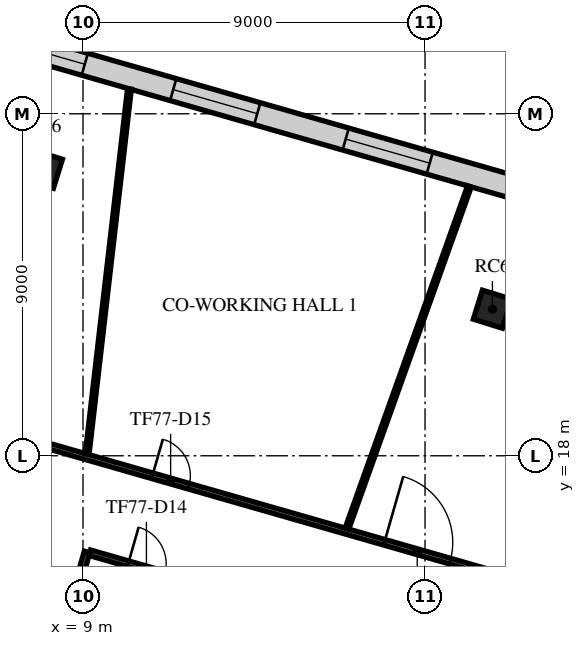
"""IFC4 building model, lengths in metres.
Left out: names, types, materials, properties, quantities, classifications, styles, units other than length and angle.
Written with IfcOpenShell. Run it as: python <this file> out.ifc"""

import sys

from ifc_helpers import new_model, si_unit, direction, frame, frame_2d, origin, origin_2d, place, context, subcontext, project, spatial, rectangle, extrude, element, fill, save


model = new_model("IFC4")
c1 = context("Model", 3, precision=1e-05, world=origin(), true_north=direction((0.0, 1.0)))
c2 = subcontext(c1, "Body", "Model", "MODEL_VIEW")
j1 = project(units=[si_unit("LENGTHUNIT", "METRE"), si_unit("PLANEANGLEUNIT", "RADIAN")], contexts=[c1])
p1 = place(None, origin())
s1 = spatial("IfcSite", under=j1, at=p1, CompositionType="ELEMENT")
p2 = place(p1, origin())
s2 = spatial("IfcBuilding", under=s1, at=p2, CompositionType="ELEMENT")
p3 = place(p2, frame((0.0, 0.0, 324.5)))
s3 = spatial("IfcBuildingStorey", under=s2, at=p3, CompositionType="ELEMENT", Elevation=324.5)
for number, where, z_axis, x_axis in (
    (1, (19.773, 21.857, 0.0), (0.0, 0.0, 1.0), (0.298, 0.955, 0.0)),
    (2, (7.958, 25.539, 0.0), (0.0, 0.0, 1.0), (0.298, 0.955, 0.0)),
):
    element("IfcColumn", number, at=place(p3, frame(where, z_axis=z_axis, x_axis=x_axis)), inside=s3, PredefinedType="COLUMN", context=c2, shape_type="SweptSolid", body=[
        extrude(rectangle(XDim=0.8, YDim=0.8, at=origin_2d()), origin(), (0.0, 0.0, 1.0), 4.0),
    ])
p4 = place(p3, frame((19.053, -30.42, 0.0), z_axis=(0.0, 0.0, 1.0), x_axis=(0.275637022814, 0.961261791425, 0.0)))
e3 = element("IfcWall", 3, at=p4, inside=s3, PredefinedType="STANDARD", context=c2, shape_type="SweptSolid", body=[
    extrude(rectangle(XDim=47.979, YDim=0.6, at=frame_2d((23.99, 0.0))), origin(), (0.0, 0.0, 1.0), 3.65),
])
p5 = place(p4, frame((1.231, 0.0, 0.9)))
e4 = element("IfcOpeningElement", 4, at=p5, cuts=e3, PredefinedType="OPENING", context=c2, shape_type="SweptSolid", body=[
    extrude(rectangle(XDim=1.9, YDim=2.1, at=frame_2d((0.95, 1.05))), frame((0.0, 0.31, 0.0), z_axis=(0.0, -1.0, 0.0), x_axis=(1.0, 0.0, 0.0)), (0.0, 0.0, 1.0), 0.62),
])
p6 = place(p4, frame((5.593, 0.0, 0.9)))
e5 = element("IfcOpeningElement", 5, at=p6, cuts=e3, PredefinedType="OPENING", context=c2, shape_type="SweptSolid", body=[
    extrude(rectangle(XDim=1.9, YDim=2.1, at=frame_2d((0.95, 1.05))), frame((0.0, 0.31, 0.0), z_axis=(0.0, -1.0, 0.0), x_axis=(1.0, 0.0, 0.0)), (0.0, 0.0, 1.0), 0.62),
])
p7 = place(p4, frame((9.954, 0.0, 0.9)))
e6 = element("IfcOpeningElement", 6, at=p7, cuts=e3, PredefinedType="OPENING", context=c2, shape_type="SweptSolid", body=[
    extrude(rectangle(XDim=1.9, YDim=2.1, at=frame_2d((0.95, 1.05))), frame((0.0, 0.31, 0.0), z_axis=(0.0, -1.0, 0.0), x_axis=(1.0, 0.0, 0.0)), (0.0, 0.0, 1.0), 0.62),
])
p8 = place(p4, frame((14.316, 0.0, 0.9)))
e7 = element("IfcOpeningElement", 7, at=p8, cuts=e3, PredefinedType="OPENING", context=c2, shape_type="SweptSolid", body=[
    extrude(rectangle(XDim=1.9, YDim=2.1, at=frame_2d((0.95, 1.05))), frame((0.0, 0.31, 0.0), z_axis=(0.0, -1.0, 0.0), x_axis=(1.0, 0.0, 0.0)), (0.0, 0.0, 1.0), 0.62),
])
p9 = place(p4, frame((18.678, 0.0, 0.9)))
e8 = element("IfcOpeningElement", 8, at=p9, cuts=e3, PredefinedType="OPENING", context=c2, shape_type="SweptSolid", body=[
    extrude(rectangle(XDim=1.9, YDim=2.1, at=frame_2d((0.95, 1.05))), frame((0.0, 0.31, 0.0), z_axis=(0.0, -1.0, 0.0), x_axis=(1.0, 0.0, 0.0)), (0.0, 0.0, 1.0), 0.62),
])
p10 = place(p4, frame((23.04, 0.0, 0.9)))
e9 = element("IfcOpeningElement", 9, at=p10, cuts=e3, PredefinedType="OPENING", context=c2, shape_type="SweptSolid", body=[
    extrude(rectangle(XDim=1.9, YDim=2.1, at=frame_2d((0.95, 1.05))), frame((0.0, 0.31, 0.0), z_axis=(0.0, -1.0, 0.0), x_axis=(1.0, 0.0, 0.0)), (0.0, 0.0, 1.0), 0.62),
])
p11 = place(p4, frame((27.401, 0.0, 0.9)))
e10 = element("IfcOpeningElement", 10, at=p11, cuts=e3, PredefinedType="OPENING", context=c2, shape_type="SweptSolid", body=[
    extrude(rectangle(XDim=1.9, YDim=2.1, at=frame_2d((0.95, 1.05))), frame((0.0, 0.31, 0.0), z_axis=(0.0, -1.0, 0.0), x_axis=(1.0, 0.0, 0.0)), (0.0, 0.0, 1.0), 0.62),
])
p12 = place(p4, frame((31.763, 0.0, 0.9)))
e11 = element("IfcOpeningElement", 11, at=p12, cuts=e3, PredefinedType="OPENING", context=c2, shape_type="SweptSolid", body=[
    extrude(rectangle(XDim=1.9, YDim=2.1, at=frame_2d((0.95, 1.05))), frame((0.0, 0.31, 0.0), z_axis=(0.0, -1.0, 0.0), x_axis=(1.0, 0.0, 0.0)), (0.0, 0.0, 1.0), 0.62),
])
p13 = place(p4, frame((36.125, 0.0, 0.9)))
e12 = element("IfcOpeningElement", 12, at=p13, cuts=e3, PredefinedType="OPENING", context=c2, shape_type="SweptSolid", body=[
    extrude(rectangle(XDim=1.9, YDim=2.1, at=frame_2d((0.95, 1.05))), frame((0.0, 0.31, 0.0), z_axis=(0.0, -1.0, 0.0), x_axis=(1.0, 0.0, 0.0)), (0.0, 0.0, 1.0), 0.62),
])
p14 = place(p4, frame((40.487, 0.0, 0.9)))
e13 = element("IfcOpeningElement", 13, at=p14, cuts=e3, PredefinedType="OPENING", context=c2, shape_type="SweptSolid", body=[
    extrude(rectangle(XDim=1.9, YDim=2.1, at=frame_2d((0.95, 1.05))), frame((0.0, 0.31, 0.0), z_axis=(0.0, -1.0, 0.0), x_axis=(1.0, 0.0, 0.0)), (0.0, 0.0, 1.0), 0.62),
])
p15 = place(p4, frame((44.848, 0.0, 0.9)))
e14 = element("IfcOpeningElement", 14, at=p15, cuts=e3, PredefinedType="OPENING", context=c2, shape_type="SweptSolid", body=[
    extrude(rectangle(XDim=1.9, YDim=2.1, at=frame_2d((0.95, 1.05))), frame((0.0, 0.31, 0.0), z_axis=(0.0, -1.0, 0.0), x_axis=(1.0, 0.0, 0.0)), (0.0, 0.0, 1.0), 0.62),
])
p16 = place(p3, frame((28.363, 22.764, 0.0), z_axis=(0.0, 0.0, 1.0), x_axis=(-0.961261801459, 0.275636987823, 0.0)))
e15 = element("IfcWall", 15, at=p16, inside=s3, PredefinedType="STANDARD", context=c2, shape_type="SweptSolid", body=[
    extrude(rectangle(XDim=42.49, YDim=0.6, at=frame_2d((21.245, 0.0))), origin(), (0.0, 0.0, 1.0), 3.65),
])
p17 = place(p16, frame((1.21, 0.0, 0.9)))
e16 = element("IfcOpeningElement", 16, at=p17, cuts=e15, PredefinedType="OPENING", context=c2, shape_type="SweptSolid", body=[
    extrude(rectangle(XDim=2.3, YDim=2.1, at=frame_2d((1.15, 1.05))), frame((0.0, 0.31, 0.0), z_axis=(0.0, -1.0, 0.0), x_axis=(1.0, 0.0, 0.0)), (0.0, 0.0, 1.0), 0.62),
])
p18 = place(p16, frame((5.932, 0.0, 0.9)))
e17 = element("IfcOpeningElement", 17, at=p18, cuts=e15, PredefinedType="OPENING", context=c2, shape_type="SweptSolid", body=[
    extrude(rectangle(XDim=2.3, YDim=2.1, at=frame_2d((1.15, 1.05))), frame((0.0, 0.31, 0.0), z_axis=(0.0, -1.0, 0.0), x_axis=(1.0, 0.0, 0.0)), (0.0, 0.0, 1.0), 0.62),
])
p19 = place(p16, frame((10.653, 0.0, 0.9)))
e18 = element("IfcOpeningElement", 18, at=p19, cuts=e15, PredefinedType="OPENING", context=c2, shape_type="SweptSolid", body=[
    extrude(rectangle(XDim=2.3, YDim=2.1, at=frame_2d((1.15, 1.05))), frame((0.0, 0.31, 0.0), z_axis=(0.0, -1.0, 0.0), x_axis=(1.0, 0.0, 0.0)), (0.0, 0.0, 1.0), 0.62),
])
p20 = place(p16, frame((15.374, 0.0, 0.9)))
e19 = element("IfcOpeningElement", 19, at=p20, cuts=e15, PredefinedType="OPENING", context=c2, shape_type="SweptSolid", body=[
    extrude(rectangle(XDim=2.3, YDim=2.1, at=frame_2d((1.15, 1.05))), frame((0.0, 0.31, 0.0), z_axis=(0.0, -1.0, 0.0), x_axis=(1.0, 0.0, 0.0)), (0.0, 0.0, 1.0), 0.62),
])
p21 = place(p16, frame((20.095, 0.0, 0.9)))
e20 = element("IfcOpeningElement", 20, at=p21, cuts=e15, PredefinedType="OPENING", context=c2, shape_type="SweptSolid", body=[
    extrude(rectangle(XDim=2.3, YDim=2.1, at=frame_2d((1.15, 1.05))), frame((0.0, 0.31, 0.0), z_axis=(0.0, -1.0, 0.0), x_axis=(1.0, 0.0, 0.0)), (0.0, 0.0, 1.0), 0.62),
])
p22 = place(p16, frame((24.816, 0.0, 0.9)))
e21 = element("IfcOpeningElement", 21, at=p22, cuts=e15, PredefinedType="OPENING", context=c2, shape_type="SweptSolid", body=[
    extrude(rectangle(XDim=2.3, YDim=2.1, at=frame_2d((1.15, 1.05))), frame((0.0, 0.31, 0.0), z_axis=(0.0, -1.0, 0.0), x_axis=(1.0, 0.0, 0.0)), (0.0, 0.0, 1.0), 0.62),
])
p23 = place(p16, frame((29.537, 0.0, 0.9)))
e22 = element("IfcOpeningElement", 22, at=p23, cuts=e15, PredefinedType="OPENING", context=c2, shape_type="SweptSolid", body=[
    extrude(rectangle(XDim=2.3, YDim=2.1, at=frame_2d((1.15, 1.05))), frame((0.0, 0.31, 0.0), z_axis=(0.0, -1.0, 0.0), x_axis=(1.0, 0.0, 0.0)), (0.0, 0.0, 1.0), 0.62),
])
p24 = place(p16, frame((34.258, 0.0, 0.9)))
e23 = element("IfcOpeningElement", 23, at=p24, cuts=e15, PredefinedType="OPENING", context=c2, shape_type="SweptSolid", body=[
    extrude(rectangle(XDim=2.3, YDim=2.1, at=frame_2d((1.15, 1.05))), frame((0.0, 0.31, 0.0), z_axis=(0.0, -1.0, 0.0), x_axis=(1.0, 0.0, 0.0)), (0.0, 0.0, 1.0), 0.62),
])
p25 = place(p16, frame((38.979, 0.0, 0.9)))
e24 = element("IfcOpeningElement", 24, at=p25, cuts=e15, PredefinedType="OPENING", context=c2, shape_type="SweptSolid", body=[
    extrude(rectangle(XDim=2.3, YDim=2.1, at=frame_2d((1.15, 1.05))), frame((0.0, 0.31, 0.0), z_axis=(0.0, -1.0, 0.0), x_axis=(1.0, 0.0, 0.0)), (0.0, 0.0, 1.0), 0.62),
])
p26 = place(p3, frame((-13.103, 24.334, 0.0), z_axis=(0.0, 0.0, 1.0), x_axis=(0.961265813226, -0.275622996723, 0.0)))
e25 = element("IfcWall", 25, at=p26, inside=s3, PredefinedType="PARTITIONING", context=c2, shape_type="SweptSolid", body=[
    extrude(rectangle(XDim=38.68, YDim=0.15, at=frame_2d((19.34, 0.0))), origin(), (0.0, 0.0, 1.0), 3.25),
])
p27 = place(p26, frame((7.05, 0.0, 0.0)))
e26 = element("IfcOpeningElement", 26, at=p27, cuts=e25, PredefinedType="OPENING", context=c2, shape_type="SweptSolid", body=[
    extrude(rectangle(XDim=1.8, YDim=2.1, at=frame_2d((0.9, 1.05))), frame((0.0, 0.085, 0.0), z_axis=(0.0, -1.0, 0.0), x_axis=(1.0, 0.0, 0.0)), (0.0, 0.0, 1.0), 0.17),
])
p28 = place(p26, frame((19.547, 0.0, 0.0)))
e27 = element("IfcOpeningElement", 27, at=p28, cuts=e25, PredefinedType="OPENING", context=c2, shape_type="SweptSolid", body=[
    extrude(rectangle(XDim=1.0, YDim=2.1, at=frame_2d((0.5, 1.05))), frame((0.0, 0.085, 0.0), z_axis=(0.0, -1.0, 0.0), x_axis=(1.0, 0.0, 0.0)), (0.0, 0.0, 1.0), 0.17),
])
p29 = place(p26, frame((24.893, 0.0, 0.0)))
e28 = element("IfcOpeningElement", 28, at=p29, cuts=e25, PredefinedType="OPENING", context=c2, shape_type="SweptSolid", body=[
    extrude(rectangle(XDim=1.0, YDim=2.1, at=frame_2d((0.5, 1.05))), frame((0.0, 0.085, 0.0), z_axis=(0.0, -1.0, 0.0), x_axis=(1.0, 0.0, 0.0)), (0.0, 0.0, 1.0), 0.17),
])
p30 = place(p26, frame((31.243, 0.0, 0.0)))
e29 = element("IfcOpeningElement", 29, at=p30, cuts=e25, PredefinedType="OPENING", context=c2, shape_type="SweptSolid", body=[
    extrude(rectangle(XDim=1.8, YDim=2.1, at=frame_2d((0.9, 1.05))), frame((0.0, 0.085, 0.0), z_axis=(0.0, -1.0, 0.0), x_axis=(1.0, 0.0, 0.0)), (0.0, 0.0, 1.0), 0.17),
])
p31 = place(p3, frame((8.227, 12.4, 0.0), z_axis=(0.0, 0.0, 1.0), x_axis=(0.275589573409, 0.961275396038, 0.0)))
e30 = element("IfcWall", 30, at=p31, inside=s3, PredefinedType="PARTITIONING", context=c2, shape_type="SweptSolid", body=[
    extrude(rectangle(XDim=3.193, YDim=0.15, at=frame_2d((1.596, 0.0))), origin(), (0.0, 0.0, 1.0), 3.25),
])
p32 = place(p3, frame((9.179, 15.448, 0.0), z_axis=(0.0, 0.0, 1.0), x_axis=(0.961267886057, -0.275615767392, 0.0)))
e31 = element("IfcWall", 31, at=p32, inside=s3, PredefinedType="PARTITIONING", context=c2, shape_type="SweptSolid", body=[
    extrude(rectangle(XDim=14.812, YDim=0.15, at=frame_2d((7.406, 0.0))), origin(), (0.0, 0.0, 1.0), 3.25),
])
p33 = place(p32, frame((1.05, 0.0, 0.0)))
e32 = element("IfcOpeningElement", 32, at=p33, cuts=e31, PredefinedType="OPENING", context=c2, shape_type="SweptSolid", body=[
    extrude(rectangle(XDim=1.0, YDim=2.1, at=frame_2d((0.5, 1.05))), frame((0.0, 0.085, 0.0), z_axis=(0.0, -1.0, 0.0), x_axis=(1.0, 0.0, 0.0)), (0.0, 0.0, 1.0), 0.17),
])
p34 = place(p3, frame((9.111, 18.052, 0.0), z_axis=(0.0, 0.0, 1.0), x_axis=(0.114972177947, 0.99336871216, 0.0)))
e33 = element("IfcWall", 33, at=p34, inside=s3, PredefinedType="PARTITIONING", context=c2, shape_type="SweptSolid", body=[
    extrude(rectangle(XDim=9.664, YDim=0.1, at=frame_2d((4.832, 0.0))), origin(), (0.0, 0.0, 1.0), 3.05),
])
p35 = place(p3, frame((15.946, 16.086, 0.0), z_axis=(0.0, 0.0, 1.0), x_axis=(0.336868591799, 0.941551672432, 0.0)))
e34 = element("IfcWall", 34, at=p35, inside=s3, PredefinedType="PARTITIONING", context=c2, shape_type="SweptSolid", body=[
    extrude(rectangle(XDim=9.56, YDim=0.1, at=frame_2d((4.78, 0.0))), origin(), (0.0, 0.0, 1.0), 3.05),
])
p36 = place(p19, origin())
e35 = element("IfcWindow", 35, at=p36, inside=s3, PartitioningType="SINGLE_PANEL", PredefinedType="WINDOW", context=c2, shape_type="SweptSolid", body=[
    extrude(rectangle(XDim=2.3, YDim=2.1, at=frame_2d((1.15, 1.05))), frame((0.0, 0.03, 0.0), z_axis=(0.0, -1.0, 0.0), x_axis=(1.0, 0.0, 0.0)), (0.0, 0.0, 1.0), 0.06),
])
fill(e18, e35)
p37 = place(p20, origin())
e36 = element("IfcWindow", 36, at=p37, inside=s3, PartitioningType="SINGLE_PANEL", PredefinedType="WINDOW", context=c2, shape_type="SweptSolid", body=[
    extrude(rectangle(XDim=2.3, YDim=2.1, at=frame_2d((1.15, 1.05))), frame((0.0, 0.03, 0.0), z_axis=(0.0, -1.0, 0.0), x_axis=(1.0, 0.0, 0.0)), (0.0, 0.0, 1.0), 0.06),
])
fill(e19, e36)
p38 = place(p21, origin())
e37 = element("IfcWindow", 37, at=p38, inside=s3, PartitioningType="SINGLE_PANEL", PredefinedType="WINDOW", context=c2, shape_type="SweptSolid", body=[
    extrude(rectangle(XDim=2.3, YDim=2.1, at=frame_2d((1.15, 1.05))), frame((0.0, 0.03, 0.0), z_axis=(0.0, -1.0, 0.0), x_axis=(1.0, 0.0, 0.0)), (0.0, 0.0, 1.0), 0.06),
])
fill(e20, e37)
p39 = place(p33, frame((1.0, 0.0, 0.0), z_axis=(0.0, 0.0, 1.0), x_axis=(-1.0, 0.0, 0.0)))
e38 = element("IfcDoor", 38, at=p39, inside=s3, OperationType="SINGLE_SWING_RIGHT", PredefinedType="DOOR", context=c2, shape_type="SweptSolid", body=[
    extrude(rectangle(XDim=1.0, YDim=2.1, at=frame_2d((0.5, 1.05))), frame((0.0, 0.025, 0.0), z_axis=(0.0, -1.0, 0.0), x_axis=(1.0, 0.0, 0.0)), (0.0, 0.0, 1.0), 0.05),
])
fill(e32, e38)
p40 = place(p29, origin())
e39 = element("IfcDoor", 39, at=p40, inside=s3, OperationType="SINGLE_SWING_LEFT", PredefinedType="DOOR", context=c2, shape_type="SweptSolid", body=[
    extrude(rectangle(XDim=1.0, YDim=2.1, at=frame_2d((0.5, 1.05))), frame((0.0, 0.025, 0.0), z_axis=(0.0, -1.0, 0.0), x_axis=(1.0, 0.0, 0.0)), (0.0, 0.0, 1.0), 0.05),
])
fill(e28, e39)
p41 = place(p30, origin())
e40 = element("IfcDoor", 40, at=p41, inside=s3, OperationType="DOUBLE_DOOR_SINGLE_SWING", PredefinedType="DOOR", context=c2, shape_type="SweptSolid", body=[
    extrude(rectangle(XDim=1.8, YDim=2.1, at=frame_2d((0.9, 1.05))), frame((0.0, 0.025, 0.0), z_axis=(0.0, -1.0, 0.0), x_axis=(1.0, 0.0, 0.0)), (0.0, 0.0, 1.0), 0.05),
])
fill(e29, e40)
save(model, sys.argv[1])
